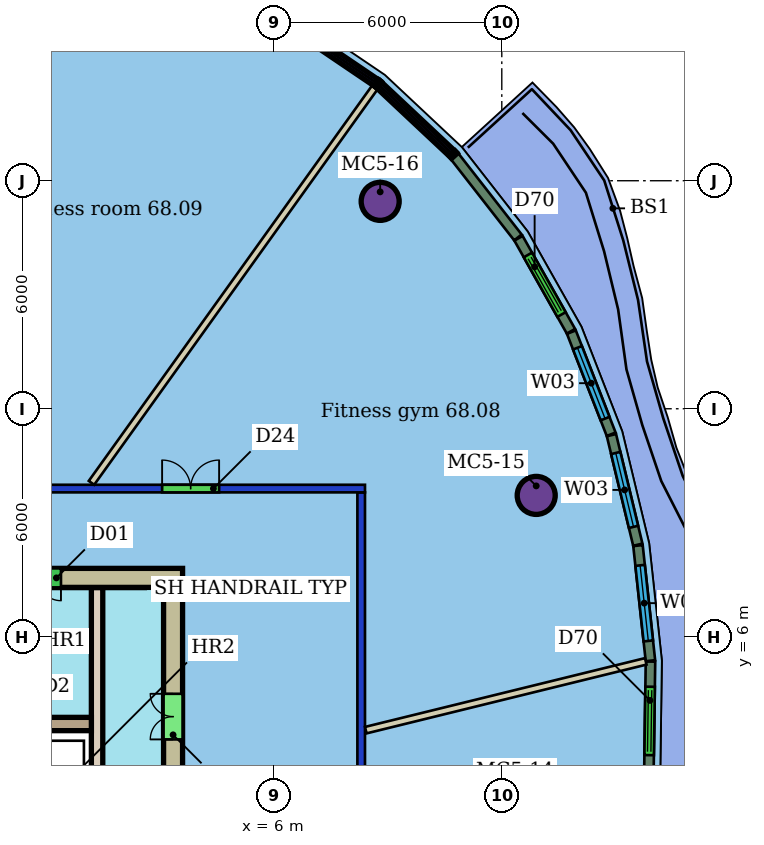
"""IFC4 building model, lengths in metres.
Left out: names, types, materials, properties, quantities, classifications, styles, units other than length and angle.
Written with IfcOpenShell. Run it as: python <this file> out.ifc"""

import sys

from ifc_helpers import new_model, si_unit, direction, frame, frame_2d, origin, origin_2d, place, context, subcontext, project, spatial, rectangle, hollow_circle, extrude, element, fill, save


model = new_model("IFC4")
c1 = context("Model", 3, precision=1e-05, world=origin(), true_north=direction((0.0, 1.0)))
c2 = subcontext(c1, "Body", "Model", "MODEL_VIEW")
j1 = project(units=[si_unit("LENGTHUNIT", "METRE"), si_unit("PLANEANGLEUNIT", "RADIAN")], contexts=[c1])
p1 = place(None, origin())
s1 = spatial("IfcSite", under=j1, at=p1, CompositionType="ELEMENT")
p2 = place(p1, origin())
s2 = spatial("IfcBuilding", under=s1, at=p2, CompositionType="ELEMENT")
p3 = place(p2, frame((0.0, 0.0, 275.7)))
s3 = spatial("IfcBuildingStorey", under=s2, at=p3, CompositionType="ELEMENT", Elevation=275.7)
for number, where, z_axis, x_axis in (
    (1, (12.906, 9.72, 0.0), (0.0, 0.0, 1.0), (1.0, 0.0, 0.0)),
    (2, (8.8, 17.457, 0.0), (0.0, 0.0, 1.0), (1.0, 0.0, 0.0)),
):
    element("IfcColumn", number, at=place(p3, frame(where, z_axis=z_axis, x_axis=x_axis)), inside=s3, PredefinedType="COLUMN", context=c2, shape_type="SweptSolid", body=[
        extrude(hollow_circle(Radius=0.5, WallThickness=0.04, at=origin_2d()), origin(), (0.0, 0.0, 1.0), 3.45),
    ])
p4 = place(p3, frame((-20.4, 9.9, 0.0), z_axis=(0.0, 0.0, 1.0), x_axis=(1.0, 0.0, 0.0)))
e3 = element("IfcWall", 3, at=p4, inside=s3, PredefinedType="PARTITIONING", context=c2, shape_type="SweptSolid", body=[
    extrude(rectangle(XDim=28.8, YDim=0.2, at=frame_2d((14.4, 0.0))), origin(), (0.0, 0.0, 1.0), 3.1),
])
p5 = place(p4, frame((12.722, 0.0, 0.0)))
e4 = element("IfcOpeningElement", 4, at=p5, cuts=e3, PredefinedType="OPENING", context=c2, shape_type="SweptSolid", body=[
    extrude(rectangle(XDim=0.9, YDim=2.1, at=frame_2d((0.45, 1.05))), frame((0.0, 0.11, 0.0), z_axis=(0.0, -1.0, 0.0), x_axis=(1.0, 0.0, 0.0)), (0.0, 0.0, 1.0), 0.22),
])
p6 = place(p4, frame((6.459, 0.0, 0.0)))
e5 = element("IfcOpeningElement", 5, at=p6, cuts=e3, PredefinedType="OPENING", context=c2, shape_type="SweptSolid", body=[
    extrude(rectangle(XDim=1.8, YDim=2.1, at=frame_2d((0.9, 1.05))), frame((0.0, 0.11, 0.0), z_axis=(0.0, -1.0, 0.0), x_axis=(1.0, 0.0, 0.0)), (0.0, 0.0, 1.0), 0.22),
])
p7 = place(p4, frame((23.461, 0.0, 0.0)))
e6 = element("IfcOpeningElement", 6, at=p7, cuts=e3, PredefinedType="OPENING", context=c2, shape_type="SweptSolid", body=[
    extrude(rectangle(XDim=1.5, YDim=2.1, at=frame_2d((0.75, 1.05))), frame((0.0, 0.11, 0.0), z_axis=(0.0, -1.0, 0.0), x_axis=(1.0, 0.0, 0.0)), (0.0, 0.0, 1.0), 0.22),
])
p8 = place(p4, frame((19.12, 0.0, 0.0)))
e7 = element("IfcOpeningElement", 7, at=p8, cuts=e3, PredefinedType="OPENING", context=c2, shape_type="SweptSolid", body=[
    extrude(rectangle(XDim=1.0, YDim=2.1, at=frame_2d((0.5, 1.05))), frame((0.0, 0.11, 0.0), z_axis=(0.0, -1.0, 0.0), x_axis=(1.0, 0.0, 0.0)), (0.0, 0.0, 1.0), 0.22),
])
p9 = place(p3, frame((8.3, 9.8, 0.0), z_axis=(0.0, 0.0, 1.0), x_axis=(0.0, -1.0, 0.0)))
e8 = element("IfcWall", 8, at=p9, inside=s3, PredefinedType="PARTITIONING", context=c2, shape_type="SweptSolid", body=[
    extrude(rectangle(XDim=19.6, YDim=0.2, at=frame_2d((9.8, 0.0))), origin(), (0.0, 0.0, 1.0), 3.1),
])
p10 = place(p9, frame((7.911, 0.0, 0.0)))
e9 = element("IfcOpeningElement", 9, at=p10, cuts=e8, PredefinedType="OPENING", context=c2, shape_type="SweptSolid", body=[
    extrude(rectangle(XDim=1.5, YDim=2.4, at=frame_2d((0.75, 1.2))), frame((0.0, 0.11, 0.0), z_axis=(0.0, -1.0, 0.0), x_axis=(1.0, 0.0, 0.0)), (0.0, 0.0, 1.0), 0.22),
])
p11 = place(p3, frame((15.788, 5.354, 0.0), z_axis=(0.0, 0.0, 1.0), x_axis=(-0.971109605093, -0.238633893016, 0.0)))
e10 = element("IfcWall", 10, at=p11, inside=s3, PredefinedType="PARTITIONING", context=c2, shape_type="SweptSolid", body=[
    extrude(rectangle(XDim=7.586, YDim=0.175, at=frame_2d((3.793, 0.0))), origin(), (0.0, 0.0, 1.0), 3.45),
])
p12 = place(p3, frame((8.658, 20.453, 0.0), z_axis=(0.0, 0.0, 1.0), x_axis=(-0.582506127463, -0.812826310763, 0.0)))
e11 = element("IfcWall", 11, at=p12, inside=s3, PredefinedType="PARTITIONING", context=c2, shape_type="SweptSolid", body=[
    extrude(rectangle(XDim=12.797, YDim=0.175, at=frame_2d((6.399, 0.0))), origin(), (0.0, 0.0, 1.0), 3.45),
])
p13 = place(p3, frame((15.868, 2.225, 0.0), z_axis=(0.0, 0.0, 1.0), x_axis=(0.014305470557, 0.999897671521, 0.0)))
e12 = element("IfcWall", 12, at=p13, inside=s3, PredefinedType="SOLIDWALL", context=c2, shape_type="SweptSolid", body=[
    extrude(rectangle(XDim=3.123, YDim=0.25, at=frame_2d((1.562, 0.0))), origin(), (0.0, 0.0, 1.0), 3.15),
])
p14 = place(p13, frame((0.661, 0.0, 0.0)))
e13 = element("IfcOpeningElement", 13, at=p14, cuts=e12, PredefinedType="OPENING", context=c2, shape_type="SweptSolid", body=[
    extrude(rectangle(XDim=1.8, YDim=2.4, at=frame_2d((0.9, 1.2))), frame((0.0, 0.135, 0.0), z_axis=(0.0, -1.0, 0.0), x_axis=(1.0, 0.0, 0.0)), (0.0, 0.0, 1.0), 0.27),
])
p15 = place(p3, frame((15.912, 5.371, 0.0), z_axis=(0.0, 0.0, 1.0), x_axis=(-0.107713070427, 0.9941820228, 0.0)))
e14 = element("IfcWall", 14, at=p15, inside=s3, PredefinedType="SOLIDWALL", context=c2, shape_type="SweptSolid", body=[
    extrude(rectangle(XDim=3.046, YDim=0.25, at=frame_2d((1.523, 0.0))), origin(), (0.0, 0.0, 1.0), 3.15),
])
p16 = place(p15, frame((0.523, 0.0, 0.9)))
e15 = element("IfcOpeningElement", 15, at=p16, cuts=e14, PredefinedType="OPENING", context=c2, shape_type="SweptSolid", body=[
    extrude(rectangle(XDim=2.0, YDim=2.1, at=frame_2d((1.0, 1.05))), frame((0.0, 0.135, 0.0), z_axis=(0.0, -1.0, 0.0), x_axis=(1.0, 0.0, 0.0)), (0.0, 0.0, 1.0), 0.27),
])
p17 = place(p3, frame((15.579, 8.423, 0.0), z_axis=(0.0, 0.0, 1.0), x_axis=(-0.234039423918, 0.97222710724, 0.0)))
e16 = element("IfcWall", 16, at=p17, inside=s3, PredefinedType="SOLIDWALL", context=c2, shape_type="SweptSolid", body=[
    extrude(rectangle(XDim=2.965, YDim=0.25, at=frame_2d((1.482, 0.0))), origin(), (0.0, 0.0, 1.0), 3.15),
])
p18 = place(p17, frame((0.482, 0.0, 0.9)))
e17 = element("IfcOpeningElement", 17, at=p18, cuts=e16, PredefinedType="OPENING", context=c2, shape_type="SweptSolid", body=[
    extrude(rectangle(XDim=2.0, YDim=2.1, at=frame_2d((1.0, 1.05))), frame((0.0, 0.135, 0.0), z_axis=(0.0, -1.0, 0.0), x_axis=(1.0, 0.0, 0.0)), (0.0, 0.0, 1.0), 0.27),
])
p19 = place(p3, frame((14.878, 11.329, 0.0), z_axis=(0.0, 0.0, 1.0), x_axis=(-0.363026334358, 0.931778879651, 0.0)))
e18 = element("IfcWall", 18, at=p19, inside=s3, PredefinedType="SOLIDWALL", context=c2, shape_type="SweptSolid", body=[
    extrude(rectangle(XDim=2.884, YDim=0.25, at=frame_2d((1.442, 0.0))), origin(), (0.0, 0.0, 1.0), 3.15),
])
p20 = place(p19, frame((0.442, 0.0, 0.9)))
e19 = element("IfcOpeningElement", 19, at=p20, cuts=e18, PredefinedType="OPENING", context=c2, shape_type="SweptSolid", body=[
    extrude(rectangle(XDim=2.0, YDim=2.1, at=frame_2d((1.0, 1.05))), frame((0.0, 0.135, 0.0), z_axis=(0.0, -1.0, 0.0), x_axis=(1.0, 0.0, 0.0)), (0.0, 0.0, 1.0), 0.27),
])
p21 = place(p3, frame((13.82, 14.04, 0.0), z_axis=(0.0, 0.0, 1.0), x_axis=(-0.491498689368, 0.870878314318, 0.0)))
e20 = element("IfcWall", 20, at=p21, inside=s3, PredefinedType="SOLIDWALL", context=c2, shape_type="SweptSolid", body=[
    extrude(rectangle(XDim=2.809, YDim=0.25, at=frame_2d((1.405, 0.0))), origin(), (0.0, 0.0, 1.0), 3.15),
])
p22 = place(p21, frame((0.505, 0.0, 0.0)))
e21 = element("IfcOpeningElement", 21, at=p22, cuts=e20, PredefinedType="OPENING", context=c2, shape_type="SweptSolid", body=[
    extrude(rectangle(XDim=1.8, YDim=2.4, at=frame_2d((0.9, 1.2))), frame((0.0, 0.135, 0.0), z_axis=(0.0, -1.0, 0.0), x_axis=(1.0, 0.0, 0.0)), (0.0, 0.0, 1.0), 0.27),
])
p23 = place(p3, frame((12.425, 16.508, 0.0), z_axis=(0.0, 0.0, 1.0), x_axis=(-0.615339251215, 0.788262396613, 0.0)))
e22 = element("IfcWall", 22, at=p23, inside=s3, PredefinedType="SOLIDWALL", context=c2, shape_type="SweptSolid", body=[
    extrude(rectangle(XDim=2.705, YDim=0.25, at=frame_2d((1.353, 0.0))), origin(), (0.0, 0.0, 1.0), 3.15),
])
p24 = place(p3, frame((3.6, 7.55, 0.0), z_axis=(0.0, 0.0, 1.0), x_axis=(-1.0, 0.0, 0.0)))
e23 = element("IfcWall", 23, at=p24, inside=s3, PredefinedType="SHEAR", context=c2, shape_type="SweptSolid", body=[
    extrude(rectangle(XDim=9.6, YDim=0.5, at=frame_2d((4.8, 0.0))), origin(), (0.0, 0.0, 1.0), 3.3),
])
p25 = place(p24, frame((3.2, 0.0, 0.0)))
e24 = element("IfcOpeningElement", 24, at=p25, cuts=e23, PredefinedType="OPENING", context=c2, shape_type="SweptSolid", body=[
    extrude(rectangle(XDim=1.2, YDim=2.1, at=frame_2d((0.6, 1.05))), frame((0.0, 0.26, 0.0), z_axis=(0.0, -1.0, 0.0), x_axis=(1.0, 0.0, 0.0)), (0.0, 0.0, 1.0), 0.52),
])
p26 = place(p3, frame((3.35, -7.3, 0.0), z_axis=(0.0, 0.0, 1.0), x_axis=(0.0, 1.0, 0.0)))
e25 = element("IfcWall", 25, at=p26, inside=s3, PredefinedType="SHEAR", context=c2, shape_type="SweptSolid", body=[
    extrude(rectangle(XDim=14.6, YDim=0.5, at=frame_2d((7.3, 0.0))), origin(), (0.0, 0.0, 1.0), 3.3),
])
p27 = place(p26, frame((2.8, 0.0, 0.0)))
e26 = element("IfcOpeningElement", 26, at=p27, cuts=e25, PredefinedType="OPENING", context=c2, shape_type="SweptSolid", body=[
    extrude(rectangle(XDim=1.2, YDim=2.1, at=frame_2d((0.6, 1.05))), frame((0.0, 0.26, 0.0), z_axis=(0.0, -1.0, 0.0), x_axis=(1.0, 0.0, 0.0)), (0.0, 0.0, 1.0), 0.52),
])
p28 = place(p26, frame((10.6, 0.0, 0.0)))
e27 = element("IfcOpeningElement", 27, at=p28, cuts=e25, PredefinedType="OPENING", context=c2, shape_type="SweptSolid", body=[
    extrude(rectangle(XDim=1.2, YDim=2.1, at=frame_2d((0.6, 1.05))), frame((0.0, 0.26, 0.0), z_axis=(0.0, -1.0, 0.0), x_axis=(1.0, 0.0, 0.0)), (0.0, 0.0, 1.0), 0.52),
])
p29 = place(p3, frame((-6.0, 3.705, 0.0), z_axis=(0.0, 0.0, 1.0), x_axis=(1.0, 0.0, 0.0)))
e28 = element("IfcWall", 28, at=p29, inside=s3, PredefinedType="SHEAR", context=c2, shape_type="SweptSolid", body=[
    extrude(rectangle(XDim=7.2, YDim=0.35, at=frame_2d((3.6, 0.0))), origin(), (0.0, 0.0, 1.0), 3.3),
])
p30 = place(p3, frame((1.35, -7.3, 0.0), z_axis=(0.0, 0.0, 1.0), x_axis=(0.0, 1.0, 0.0)))
e29 = element("IfcWall", 29, at=p30, inside=s3, PredefinedType="SHEAR", context=c2, shape_type="SweptSolid", body=[
    extrude(rectangle(XDim=14.6, YDim=0.3, at=frame_2d((7.3, 0.0))), origin(), (0.0, 0.0, 1.0), 3.3),
])
p31 = place(p30, frame((1.21, 0.0, 0.0)))
e30 = element("IfcOpeningElement", 30, at=p31, cuts=e29, PredefinedType="OPENING", context=c2, shape_type="SweptSolid", body=[
    extrude(rectangle(XDim=1.0, YDim=2.1, at=frame_2d((0.5, 1.05))), frame((0.0, 0.16, 0.0), z_axis=(0.0, -1.0, 0.0), x_axis=(1.0, 0.0, 0.0)), (0.0, 0.0, 1.0), 0.32),
])
p32 = place(p30, frame((6.55, 0.0, 0.0)))
e31 = element("IfcOpeningElement", 31, at=p32, cuts=e29, PredefinedType="OPENING", context=c2, shape_type="SweptSolid", body=[
    extrude(rectangle(XDim=1.5, YDim=2.1, at=frame_2d((0.75, 1.05))), frame((0.0, 0.16, 0.0), z_axis=(0.0, -1.0, 0.0), x_axis=(1.0, 0.0, 0.0)), (0.0, 0.0, 1.0), 0.32),
])
p33 = place(p7, origin())
e32 = element("IfcDoor", 32, at=p33, inside=s3, OperationType="DOUBLE_DOOR_SINGLE_SWING", PredefinedType="DOOR", context=c2, shape_type="SweptSolid", body=[
    extrude(rectangle(XDim=1.5, YDim=2.1, at=frame_2d((0.75, 1.05))), frame((0.0, 0.025, 0.0), z_axis=(0.0, -1.0, 0.0), x_axis=(1.0, 0.0, 0.0)), (0.0, 0.0, 1.0), 0.05),
])
fill(e6, e32)
p34 = place(p14, origin())
e33 = element("IfcDoor", 33, at=p34, inside=s3, OperationType="DOUBLE_DOOR_SLIDING", PredefinedType="DOOR", context=c2, shape_type="SweptSolid", body=[
    extrude(rectangle(XDim=1.8, YDim=2.4, at=frame_2d((0.9, 1.2))), frame((0.0, 0.025, 0.0), z_axis=(0.0, -1.0, 0.0), x_axis=(1.0, 0.0, 0.0)), (0.0, 0.0, 1.0), 0.05),
])
fill(e13, e33)
p35 = place(p16, origin())
e34 = element("IfcWindow", 34, at=p35, inside=s3, PartitioningType="SINGLE_PANEL", PredefinedType="WINDOW", context=c2, shape_type="SweptSolid", body=[
    extrude(rectangle(XDim=2.0, YDim=2.1, at=frame_2d((1.0, 1.05))), frame((0.0, 0.03, 0.0), z_axis=(0.0, -1.0, 0.0), x_axis=(1.0, 0.0, 0.0)), (0.0, 0.0, 1.0), 0.06),
])
fill(e15, e34)
p36 = place(p18, origin())
e35 = element("IfcWindow", 35, at=p36, inside=s3, PartitioningType="SINGLE_PANEL", PredefinedType="WINDOW", context=c2, shape_type="SweptSolid", body=[
    extrude(rectangle(XDim=2.0, YDim=2.1, at=frame_2d((1.0, 1.05))), frame((0.0, 0.03, 0.0), z_axis=(0.0, -1.0, 0.0), x_axis=(1.0, 0.0, 0.0)), (0.0, 0.0, 1.0), 0.06),
])
fill(e17, e35)
p37 = place(p20, origin())
e36 = element("IfcWindow", 36, at=p37, inside=s3, PartitioningType="SINGLE_PANEL", PredefinedType="WINDOW", context=c2, shape_type="SweptSolid", body=[
    extrude(rectangle(XDim=2.0, YDim=2.1, at=frame_2d((1.0, 1.05))), frame((0.0, 0.03, 0.0), z_axis=(0.0, -1.0, 0.0), x_axis=(1.0, 0.0, 0.0)), (0.0, 0.0, 1.0), 0.06),
])
fill(e19, e36)
p38 = place(p22, origin())
e37 = element("IfcDoor", 37, at=p38, inside=s3, OperationType="DOUBLE_DOOR_SLIDING", PredefinedType="DOOR", context=c2, shape_type="SweptSolid", body=[
    extrude(rectangle(XDim=1.8, YDim=2.4, at=frame_2d((0.9, 1.2))), frame((0.0, 0.025, 0.0), z_axis=(0.0, -1.0, 0.0), x_axis=(1.0, 0.0, 0.0)), (0.0, 0.0, 1.0), 0.05),
])
fill(e21, e37)
p39 = place(p25, origin())
e38 = element("IfcDoor", 38, at=p39, inside=s3, OperationType="DOUBLE_DOOR_SINGLE_SWING", PredefinedType="NOTDEFINED", context=c2, shape_type="SweptSolid", body=[
    extrude(rectangle(XDim=1.2, YDim=2.1, at=frame_2d((0.6, 1.05))), frame((0.0, 0.025, 0.0), z_axis=(0.0, -1.0, 0.0), x_axis=(1.0, 0.0, 0.0)), (0.0, 0.0, 1.0), 0.05),
])
fill(e24, e38)
p40 = place(p28, origin())
e39 = element("IfcDoor", 39, at=p40, inside=s3, OperationType="DOUBLE_DOOR_SINGLE_SWING", PredefinedType="NOTDEFINED", context=c2, shape_type="SweptSolid", body=[
    extrude(rectangle(XDim=1.2, YDim=2.1, at=frame_2d((0.6, 1.05))), frame((0.0, 0.025, 0.0), z_axis=(0.0, -1.0, 0.0), x_axis=(1.0, 0.0, 0.0)), (0.0, 0.0, 1.0), 0.05),
])
fill(e27, e39)
save(model, sys.argv[1])
